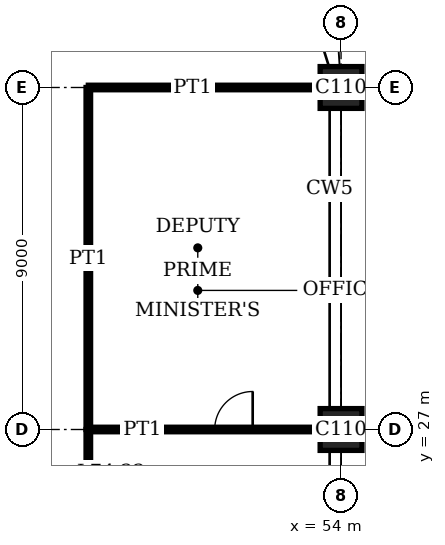
"""IFC4 building model, lengths in metres.
Left out: names, types, materials, properties, quantities, classifications, styles, units other than length and angle.
Written with IfcOpenShell. Run it as: python <this file> out.ifc"""

import sys

from ifc_helpers import new_model, si_unit, direction, frame, frame_2d, origin, origin_2d, place, context, subcontext, project, spatial, rectangle, extrude, element, fill, save


model = new_model("IFC4")
c1 = context("Model", 3, precision=1e-05, world=origin(), true_north=direction((0.0, 1.0)))
c2 = subcontext(c1, "Body", "Model", "MODEL_VIEW")
j1 = project(units=[si_unit("LENGTHUNIT", "METRE"), si_unit("PLANEANGLEUNIT", "RADIAN")], contexts=[c1])
p1 = place(None, origin())
s1 = spatial("IfcSite", under=j1, at=p1, CompositionType="ELEMENT")
p2 = place(p1, origin())
s2 = spatial("IfcBuilding", under=s1, at=p2, CompositionType="ELEMENT")
p3 = place(p2, frame((0.0, 0.0, 303.4)))
s3 = spatial("IfcBuildingStorey", under=s2, at=p3, CompositionType="ELEMENT", Elevation=303.4)
for number, where, z_axis, x_axis in (
    (1, (54.0, 27.0, 0.0), (0.0, 0.0, 1.0), (1.0, 0.0, 0.0)),
    (2, (54.0, 36.0, 0.0), (0.0, 0.0, 1.0), (1.0, 0.0, 0.0)),
):
    element("IfcColumn", number, at=place(p3, frame(where, z_axis=z_axis, x_axis=x_axis)), inside=s3, PredefinedType="COLUMN", context=c2, shape_type="SweptSolid", body=[
        extrude(rectangle(XDim=1.1, YDim=1.1, at=origin_2d()), origin(), (0.0, 0.0, 1.0), 4.0),
    ])
p4 = place(p3, frame((47.35, 27.0, 0.0), z_axis=(0.0, 0.0, 1.0), x_axis=(1.0, 0.0, 0.0)))
e3 = element("IfcWall", 3, at=p4, inside=s3, PredefinedType="PARTITIONING", context=c2, shape_type="SweptSolid", body=[
    extrude(rectangle(XDim=6.1, YDim=0.12, at=frame_2d((3.05, 0.0))), origin(), (0.0, 0.0, 1.0), 3.05),
])
p5 = place(p4, frame((3.325, 0.0, 0.0)))
e4 = element("IfcOpeningElement", 4, at=p5, cuts=e3, PredefinedType="OPENING", context=c2, shape_type="SweptSolid", body=[
    extrude(rectangle(XDim=1.0, YDim=2.4, at=frame_2d((0.5, 1.2))), frame((0.0, 0.07, 0.0), z_axis=(0.0, -1.0, 0.0), x_axis=(1.0, 0.0, 0.0)), (0.0, 0.0, 1.0), 0.14),
])
p6 = place(p3, frame((47.35, 36.0, 0.0), z_axis=(0.0, 0.0, 1.0), x_axis=(1.0, 0.0, 0.0)))
e5 = element("IfcWall", 5, at=p6, inside=s3, PredefinedType="PARTITIONING", context=c2, shape_type="SweptSolid", body=[
    extrude(rectangle(XDim=6.1, YDim=0.12, at=frame_2d((3.05, 0.0))), origin(), (0.0, 0.0, 1.0), 3.05),
])
p7 = place(p3, frame((47.35, 22.5, 0.0), z_axis=(0.0, 0.0, 1.0), x_axis=(0.0, 1.0, 0.0)))
e6 = element("IfcWall", 6, at=p7, inside=s3, PredefinedType="PARTITIONING", context=c2, shape_type="SweptSolid", body=[
    extrude(rectangle(XDim=4.5, YDim=0.12, at=frame_2d((2.25, 0.0))), origin(), (0.0, 0.0, 1.0), 3.75),
])
p8 = place(p7, frame((1.75, 0.0, 0.0)))
e7 = element("IfcOpeningElement", 7, at=p8, cuts=e6, PredefinedType="OPENING", context=c2, shape_type="SweptSolid", body=[
    extrude(rectangle(XDim=1.0, YDim=2.4, at=frame_2d((0.5, 1.2))), frame((0.0, 0.07, 0.0), z_axis=(0.0, -1.0, 0.0), x_axis=(1.0, 0.0, 0.0)), (0.0, 0.0, 1.0), 0.14),
])
p9 = place(p3, frame((47.35, 27.0, 0.0), z_axis=(0.0, 0.0, 1.0), x_axis=(0.0, 1.0, 0.0)))
e8 = element("IfcWall", 8, at=p9, inside=s3, PredefinedType="PARTITIONING", context=c2, shape_type="SweptSolid", body=[
    extrude(rectangle(XDim=9.0, YDim=0.12, at=frame_2d((4.5, 0.0))), origin(), (0.0, 0.0, 1.0), 3.75),
])
p10 = place(p5, origin())
e9 = element("IfcDoor", 9, at=p10, inside=s3, OperationType="SINGLE_SWING_LEFT", PredefinedType="DOOR", context=c2, shape_type="SweptSolid", body=[
    extrude(rectangle(XDim=1.0, YDim=2.4, at=frame_2d((0.5, 1.2))), frame((0.0, 0.025, 0.0), z_axis=(0.0, -1.0, 0.0), x_axis=(1.0, 0.0, 0.0)), (0.0, 0.0, 1.0), 0.05),
])
fill(e4, e9)
save(model, sys.argv[1])
